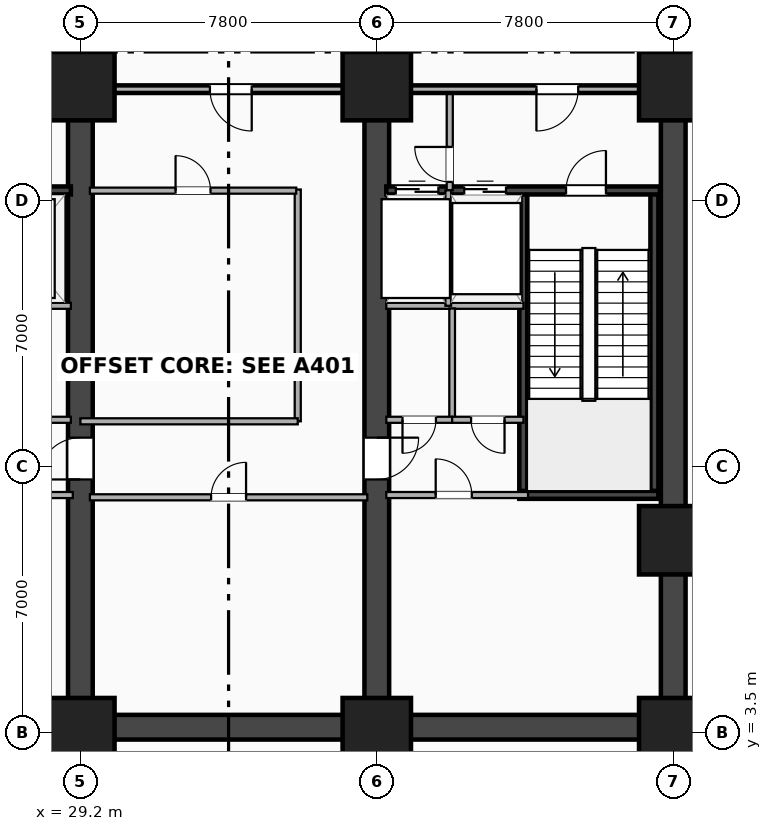
"""IFC4 building model, lengths in metres.
Left out: names, types, materials, properties, quantities, classifications, styles, units other than length and angle.
Written with IfcOpenShell. Run it as: python <this file> out.ifc"""

import sys

from ifc_helpers import new_model, si_unit, direction, frame, frame_2d, origin, origin_2d, place, context, subcontext, project, spatial, rectangle, extrude, element, fill, save


model = new_model("IFC4")
c1 = context("Model", 3, precision=1e-05, world=origin(), true_north=direction((0.0, 1.0)))
c2 = subcontext(c1, "Body", "Model", "MODEL_VIEW")
j1 = project(units=[si_unit("LENGTHUNIT", "METRE"), si_unit("PLANEANGLEUNIT", "RADIAN")], contexts=[c1])
p1 = place(None, origin())
s1 = spatial("IfcSite", under=j1, at=p1, CompositionType="ELEMENT")
p2 = place(p1, origin())
s2 = spatial("IfcBuilding", under=s1, at=p2, CompositionType="ELEMENT")
p3 = place(p2, frame((0.0, 0.0, -5.4)))
s3 = spatial("IfcBuildingStorey", under=s2, at=p3, CompositionType="ELEMENT", Elevation=-5.4)
p4 = place(p3, frame((20.3, 3.63, 0.0), z_axis=(0.0, 0.0, 1.0), x_axis=(1.0, 0.0, 0.0)))
e1 = element("IfcWall", 1, at=p4, inside=s3, PredefinedType="SHEAR", context=c2, shape_type="SweptSolid", body=[
    extrude(rectangle(XDim=24.5, YDim=0.65, at=frame_2d((12.25, 0.0))), origin(), (0.0, 0.0, 1.0), 5.05),
])
p5 = place(p3, frame((44.8, 3.5, 0.0), z_axis=(0.0, 0.0, 1.0), x_axis=(0.0, 1.0, 0.0)))
e2 = element("IfcWall", 2, at=p5, inside=s3, PredefinedType="SHEAR", context=c2, shape_type="SweptSolid", body=[
    extrude(rectangle(XDim=16.9, YDim=0.65, at=frame_2d((8.45, 0.0))), origin(), (0.0, 0.0, 1.0), 5.05),
])
p6 = place(p3, frame((29.2, 3.5, 0.0), z_axis=(0.0, 0.0, 1.0), x_axis=(0.0, 1.0, 0.0)))
e3 = element("IfcWall", 3, at=p6, inside=s3, PredefinedType="SHEAR", context=c2, shape_type="SweptSolid", body=[
    extrude(rectangle(XDim=16.9, YDim=0.65, at=frame_2d((8.45, 0.0))), origin(), (0.0, 0.0, 1.0), 5.05),
])
p7 = place(p6, frame((7.75, 0.0, 0.0), z_axis=(0.0, 0.0, 1.0), x_axis=(-1.0, 0.0, 0.0)))
e4 = element("IfcOpeningElement", 4, at=p7, cuts=e3, PredefinedType="OPENING", context=c2, shape_type="SweptSolid", body=[
    extrude(rectangle(XDim=1.1, YDim=2.15, at=frame_2d((0.55, 1.075))), frame((0.0, 0.335, 0.0), z_axis=(0.0, -1.0, 0.0), x_axis=(1.0, 0.0, 0.0)), (0.0, 0.0, 1.0), 0.67),
])
p8 = place(p3, frame((37.0, 3.5, 0.0), z_axis=(0.0, 0.0, 1.0), x_axis=(0.0, 1.0, 0.0)))
e5 = element("IfcWall", 5, at=p8, inside=s3, PredefinedType="SHEAR", context=c2, shape_type="SweptSolid", body=[
    extrude(rectangle(XDim=16.9, YDim=0.65, at=frame_2d((8.45, 0.0))), origin(), (0.0, 0.0, 1.0), 5.05),
])
p9 = place(p8, frame((6.65, 0.0, 0.0)))
e6 = element("IfcOpeningElement", 6, at=p9, cuts=e5, PredefinedType="OPENING", context=c2, shape_type="SweptSolid", body=[
    extrude(rectangle(XDim=1.1, YDim=2.15, at=frame_2d((0.55, 1.075))), frame((0.0, 0.335, 0.0), z_axis=(0.0, -1.0, 0.0), x_axis=(1.0, 0.0, 0.0)), (0.0, 0.0, 1.0), 0.67),
])
p10 = place(p3, frame((20.65, 17.755, 0.0), z_axis=(0.0, 0.0, 1.0), x_axis=(1.0, 0.0, 0.0)))
e7 = element("IfcWall", 7, at=p10, inside=s3, PredefinedType="SHEAR", context=c2, shape_type="SweptSolid", body=[
    extrude(rectangle(XDim=8.3, YDim=0.21, at=frame_2d((4.15, 0.0))), origin(), (0.0, 0.0, 1.0), 5.05),
])
p11 = place(p10, frame((2.2, 0.0, 0.0), z_axis=(0.0, 0.0, 1.0), x_axis=(-1.0, 0.0, 0.0)))
e8 = element("IfcOpeningElement", 8, at=p11, cuts=e7, PredefinedType="OPENING", context=c2, shape_type="SweptSolid", body=[
    extrude(rectangle(XDim=1.05, YDim=2.15, at=frame_2d((0.525, 1.075))), frame((0.0, 0.115, 0.0), z_axis=(0.0, -1.0, 0.0), x_axis=(1.0, 0.0, 0.0)), (0.0, 0.0, 1.0), 0.23),
])
p12 = place(p10, frame((4.15, 0.0, 0.0)))
e9 = element("IfcOpeningElement", 9, at=p12, cuts=e7, PredefinedType="OPENING", context=c2, shape_type="SweptSolid", body=[
    extrude(rectangle(XDim=1.1, YDim=2.18, at=frame_2d((0.55, 1.09))), frame((0.0, 0.115, 0.0), z_axis=(0.0, -1.0, 0.0), x_axis=(1.0, 0.0, 0.0)), (0.0, 0.0, 1.0), 0.23),
])
p13 = place(p10, frame((6.45, 0.0, 0.0)))
e10 = element("IfcOpeningElement", 10, at=p13, cuts=e7, PredefinedType="OPENING", context=c2, shape_type="SweptSolid", body=[
    extrude(rectangle(XDim=1.12, YDim=2.2, at=frame_2d((0.56, 1.1))), frame((0.0, 0.115, 0.0), z_axis=(0.0, -1.0, 0.0), x_axis=(1.0, 0.0, 0.0)), (0.0, 0.0, 1.0), 0.23),
])
for number, where, z_axis, x_axis in (
    (11, (40.855, 9.745, 0.0), (0.0, 0.0, 1.0), (0.0, 1.0, 0.0)),
    (12, (44.305, 9.745, 0.0), (0.0, 0.0, 1.0), (0.0, 1.0, 0.0)),
):
    element("IfcWall", number, at=place(p3, frame(where, z_axis=z_axis, x_axis=x_axis)), inside=s3, PredefinedType="SHEAR", context=c2, shape_type="SweptSolid", body=[
        extrude(rectangle(XDim=8.01, YDim=0.21, at=frame_2d((4.005, 0.0))), origin(), (0.0, 0.0, 1.0), 5.05),
    ])
p14 = place(p3, frame((40.75, 9.745, 0.0), z_axis=(0.0, 0.0, 1.0), x_axis=(1.0, 0.0, 0.0)))
e13 = element("IfcWall", 13, at=p14, inside=s3, PredefinedType="SHEAR", context=c2, shape_type="SweptSolid", body=[
    extrude(rectangle(XDim=3.66, YDim=0.21, at=frame_2d((1.83, 0.0))), origin(), (0.0, 0.0, 1.0), 5.05),
])
p15 = place(p3, frame((37.25, 17.755, 0.0), z_axis=(0.0, 0.0, 1.0), x_axis=(1.0, 0.0, 0.0)))
e14 = element("IfcWall", 14, at=p15, inside=s3, PredefinedType="SHEAR", context=c2, shape_type="SweptSolid", body=[
    extrude(rectangle(XDim=7.2, YDim=0.21, at=frame_2d((3.6, 0.0))), origin(), (0.0, 0.0, 1.0), 5.05),
])
p16 = place(p15, frame((0.25, 0.0, 0.0)))
e15 = element("IfcOpeningElement", 15, at=p16, cuts=e14, PredefinedType="OPENING", context=c2, shape_type="SweptSolid", body=[
    extrude(rectangle(XDim=1.12, YDim=2.2, at=frame_2d((0.56, 1.1))), frame((0.0, 0.115, 0.0), z_axis=(0.0, -1.0, 0.0), x_axis=(1.0, 0.0, 0.0)), (0.0, 0.0, 1.0), 0.23),
])
p17 = place(p15, frame((2.05, 0.0, 0.0)))
e16 = element("IfcOpeningElement", 16, at=p17, cuts=e14, PredefinedType="OPENING", context=c2, shape_type="SweptSolid", body=[
    extrude(rectangle(XDim=1.1, YDim=2.18, at=frame_2d((0.55, 1.09))), frame((0.0, 0.115, 0.0), z_axis=(0.0, -1.0, 0.0), x_axis=(1.0, 0.0, 0.0)), (0.0, 0.0, 1.0), 0.23),
])
p18 = place(p15, frame((5.78, 0.0, 0.0), z_axis=(0.0, 0.0, 1.0), x_axis=(-1.0, 0.0, 0.0)))
e17 = element("IfcOpeningElement", 17, at=p18, cuts=e14, PredefinedType="OPENING", context=c2, shape_type="SweptSolid", body=[
    extrude(rectangle(XDim=1.05, YDim=2.15, at=frame_2d((0.525, 1.075))), frame((0.0, 0.115, 0.0), z_axis=(0.0, -1.0, 0.0), x_axis=(1.0, 0.0, 0.0)), (0.0, 0.0, 1.0), 0.23),
])
for number, where, z_axis, x_axis in (
    (18, (29.2, 3.5, 0.0), (0.0, 0.0, 1.0), (1.0, 0.0, 0.0)),
    (19, (37.0, 3.5, 0.0), (0.0, 0.0, 1.0), (1.0, 0.0, 0.0)),
    (20, (44.8, 3.5, 0.0), (0.0, 0.0, 1.0), (1.0, 0.0, 0.0)),
    (21, (44.8, 8.55, 0.0), (0.0, 0.0, 1.0), (1.0, 0.0, 0.0)),
    (22, (29.2, 20.5, 0.0), (0.0, 0.0, 1.0), (1.0, 0.0, 0.0)),
    (23, (37.0, 20.5, 0.0), (0.0, 0.0, 1.0), (1.0, 0.0, 0.0)),
    (24, (44.8, 20.5, 0.0), (0.0, 0.0, 1.0), (1.0, 0.0, 0.0)),
):
    element("IfcColumn", number, at=place(p3, frame(where, z_axis=z_axis, x_axis=x_axis)), inside=s3, PredefinedType="COLUMN", context=c2, shape_type="SweptSolid", body=[
        extrude(rectangle(XDim=1.8, YDim=1.8, at=origin_2d()), origin(), (0.0, 0.0, 1.0), 5.05),
    ])
p19 = place(p3, frame((38.92, 17.76, 0.0), z_axis=(0.0, 0.0, 1.0), x_axis=(0.0, 1.0, 0.0)))
e25 = element("IfcWall", 25, at=p19, inside=s3, PredefinedType="PARTITIONING", context=c2, shape_type="SweptSolid", body=[
    extrude(rectangle(XDim=2.66, YDim=0.16, at=frame_2d((1.33, 0.0))), origin(), (0.0, 0.0, 1.0), 4.114),
])
p20 = place(p19, frame((1.14, 0.0, 0.0), z_axis=(0.0, 0.0, 1.0), x_axis=(-1.0, 0.0, 0.0)))
e26 = element("IfcOpeningElement", 26, at=p20, cuts=e25, PredefinedType="OPENING", context=c2, shape_type="SweptSolid", body=[
    extrude(rectangle(XDim=0.92, YDim=2.08, at=frame_2d((0.46, 1.04))), frame((0.0, 0.09, 0.0), z_axis=(0.0, -1.0, 0.0), x_axis=(1.0, 0.0, 0.0)), (0.0, 0.0, 1.0), 0.18),
])
p21 = place(p3, frame((24.22, 14.72, 0.0), z_axis=(0.0, 0.0, 1.0), x_axis=(1.0, 0.0, 0.0)))
e27 = element("IfcWall", 27, at=p21, inside=s3, PredefinedType="PARTITIONING", context=c2, shape_type="SweptSolid", body=[
    extrude(rectangle(XDim=4.73, YDim=0.16, at=frame_2d((2.365, 0.0))), origin(), (0.0, 0.0, 1.0), 4.18),
])
p22 = place(p3, frame((37.25, 14.72, 0.0), z_axis=(0.0, 0.0, 1.0), x_axis=(1.0, 0.0, 0.0)))
e28 = element("IfcWall", 28, at=p22, inside=s3, PredefinedType="PARTITIONING", context=c2, shape_type="SweptSolid", body=[
    extrude(rectangle(XDim=3.61, YDim=0.16, at=frame_2d((1.805, 0.0))), origin(), (0.0, 0.0, 1.0), 4.18),
])
p23 = place(p3, frame((38.88, 14.72, 0.0), z_axis=(0.0, 0.0, 1.0), x_axis=(0.0, 1.0, 0.0)))
e29 = element("IfcWall", 29, at=p23, inside=s3, PredefinedType="PARTITIONING", context=c2, shape_type="SweptSolid", body=[
    extrude(rectangle(XDim=3.04, YDim=0.15, at=frame_2d((1.52, 0.0))), origin(), (0.0, 0.0, 1.0), 5.05),
])
p24 = place(p3, frame((26.38, 20.42, 0.0), z_axis=(0.0, 0.0, 1.0), x_axis=(1.0, 0.0, 0.0)))
e30 = element("IfcWall", 30, at=p24, inside=s3, PredefinedType="PARTITIONING", context=c2, shape_type="SweptSolid", body=[
    extrude(rectangle(XDim=2.82, YDim=0.2, at=frame_2d((1.41, 0.0))), origin(), (0.0, 0.0, 1.0), 4.114),
])
p25 = place(p3, frame((29.2, 20.42, 0.0), z_axis=(0.0, 0.0, 1.0), x_axis=(1.0, 0.0, 0.0)))
e31 = element("IfcWall", 31, at=p25, inside=s3, PredefinedType="PARTITIONING", context=c2, shape_type="SweptSolid", body=[
    extrude(rectangle(XDim=7.8, YDim=0.2, at=frame_2d((3.9, 0.0))), origin(), (0.0, 0.0, 1.0), 4.114),
])
p26 = place(p25, frame((3.409, 0.0, 0.0)))
e32 = element("IfcOpeningElement", 32, at=p26, cuts=e31, PredefinedType="OPENING", context=c2, shape_type="SweptSolid", body=[
    extrude(rectangle(XDim=1.1, YDim=2.15, at=frame_2d((0.55, 1.075))), frame((0.0, 0.11, 0.0), z_axis=(0.0, -1.0, 0.0), x_axis=(1.0, 0.0, 0.0)), (0.0, 0.0, 1.0), 0.22),
])
p27 = place(p3, frame((37.0, 20.42, 0.0), z_axis=(0.0, 0.0, 1.0), x_axis=(1.0, 0.0, 0.0)))
e33 = element("IfcWall", 33, at=p27, inside=s3, PredefinedType="PARTITIONING", context=c2, shape_type="SweptSolid", body=[
    extrude(rectangle(XDim=7.45, YDim=0.2, at=frame_2d((3.725, 0.0))), origin(), (0.0, 0.0, 1.0), 4.114),
])
p28 = place(p27, frame((4.2, 0.0, 0.0)))
e34 = element("IfcOpeningElement", 34, at=p28, cuts=e33, PredefinedType="OPENING", context=c2, shape_type="SweptSolid", body=[
    extrude(rectangle(XDim=1.1, YDim=2.15, at=frame_2d((0.55, 1.075))), frame((0.0, 0.11, 0.0), z_axis=(0.0, -1.0, 0.0), x_axis=(1.0, 0.0, 0.0)), (0.0, 0.0, 1.0), 0.22),
])
p29 = place(p3, frame((24.22, 11.72, 0.0), z_axis=(0.0, 0.0, 1.0), x_axis=(1.0, 0.0, 0.0)))
e35 = element("IfcWall", 35, at=p29, inside=s3, PredefinedType="PARTITIONING", context=c2, shape_type="SweptSolid", body=[
    extrude(rectangle(XDim=4.73, YDim=0.16, at=frame_2d((2.365, 0.0))), origin(), (0.0, 0.0, 1.0), 4.18),
])
p30 = place(p29, frame((1.905, 0.0, 0.0)))
e36 = element("IfcOpeningElement", 36, at=p30, cuts=e35, PredefinedType="OPENING", context=c2, shape_type="SweptSolid", body=[
    extrude(rectangle(XDim=0.92, YDim=2.08, at=frame_2d((0.46, 1.04))), frame((0.0, 0.09, 0.0), z_axis=(0.0, -1.0, 0.0), x_axis=(1.0, 0.0, 0.0)), (0.0, 0.0, 1.0), 0.18),
])
p31 = place(p3, frame((38.983, 11.72, 0.0), z_axis=(0.0, 0.0, 1.0), x_axis=(0.0, 1.0, 0.0)))
e37 = element("IfcWall", 37, at=p31, inside=s3, PredefinedType="PARTITIONING", context=c2, shape_type="SweptSolid", body=[
    extrude(rectangle(XDim=2.93, YDim=0.15, at=frame_2d((1.465, 0.0))), origin(), (0.0, 0.0, 1.0), 5.05),
])
p32 = place(p3, frame((37.25, 11.72, 0.0), z_axis=(0.0, 0.0, 1.0), x_axis=(1.0, 0.0, 0.0)))
e38 = element("IfcWall", 38, at=p32, inside=s3, PredefinedType="PARTITIONING", context=c2, shape_type="SweptSolid", body=[
    extrude(rectangle(XDim=1.733, YDim=0.16, at=frame_2d((0.866, 0.0))), origin(), (0.0, 0.0, 1.0), 4.18),
])
p33 = place(p32, frame((0.427, 0.0, 0.0)))
e39 = element("IfcOpeningElement", 39, at=p33, cuts=e38, PredefinedType="OPENING", context=c2, shape_type="SweptSolid", body=[
    extrude(rectangle(XDim=0.88, YDim=2.08, at=frame_2d((0.44, 1.04))), frame((0.0, 0.09, 0.0), z_axis=(0.0, -1.0, 0.0), x_axis=(1.0, 0.0, 0.0)), (0.0, 0.0, 1.0), 0.18),
])
p34 = place(p3, frame((38.983, 11.72, 0.0), z_axis=(0.0, 0.0, 1.0), x_axis=(1.0, 0.0, 0.0)))
e40 = element("IfcWall", 40, at=p34, inside=s3, PredefinedType="PARTITIONING", context=c2, shape_type="SweptSolid", body=[
    extrude(rectangle(XDim=1.877, YDim=0.16, at=frame_2d((0.938, 0.0))), origin(), (0.0, 0.0, 1.0), 5.05),
])
p35 = place(p34, frame((0.499, 0.0, 0.0)))
e41 = element("IfcOpeningElement", 41, at=p35, cuts=e40, PredefinedType="OPENING", context=c2, shape_type="SweptSolid", body=[
    extrude(rectangle(XDim=0.88, YDim=2.08, at=frame_2d((0.44, 1.04))), frame((0.0, 0.09, 0.0), z_axis=(0.0, -1.0, 0.0), x_axis=(1.0, 0.0, 0.0)), (0.0, 0.0, 1.0), 0.18),
])
p36 = place(p3, frame((24.2, 9.74, 0.0), z_axis=(0.0, 0.0, 1.0), x_axis=(1.0, 0.0, 0.0)))
e42 = element("IfcWall", 42, at=p36, inside=s3, PredefinedType="PARTITIONING", context=c2, shape_type="SweptSolid", body=[
    extrude(rectangle(XDim=4.8, YDim=0.16, at=frame_2d((2.4, 0.0))), origin(), (0.0, 0.0, 1.0), 4.18),
])
p37 = place(p36, frame((2.75, 0.0, 0.0), z_axis=(0.0, 0.0, 1.0), x_axis=(-1.0, 0.0, 0.0)))
e43 = element("IfcOpeningElement", 43, at=p37, cuts=e42, PredefinedType="OPENING", context=c2, shape_type="SweptSolid", body=[
    extrude(rectangle(XDim=0.95, YDim=2.15, at=frame_2d((0.475, 1.075))), frame((0.0, 0.09, 0.0), z_axis=(0.0, -1.0, 0.0), x_axis=(1.0, 0.0, 0.0)), (0.0, 0.0, 1.0), 0.18),
])
p38 = place(p3, frame((37.25, 9.74, 0.0), z_axis=(0.0, 0.0, 1.0), x_axis=(1.0, 0.0, 0.0)))
e44 = element("IfcWall", 44, at=p38, inside=s3, PredefinedType="PARTITIONING", context=c2, shape_type="SweptSolid", body=[
    extrude(rectangle(XDim=3.73, YDim=0.16, at=frame_2d((1.865, 0.0))), origin(), (0.0, 0.0, 1.0), 4.18),
])
p39 = place(p38, frame((2.25, 0.0, 0.0), z_axis=(0.0, 0.0, 1.0), x_axis=(-1.0, 0.0, 0.0)))
e45 = element("IfcOpeningElement", 45, at=p39, cuts=e44, PredefinedType="OPENING", context=c2, shape_type="SweptSolid", body=[
    extrude(rectangle(XDim=0.95, YDim=2.15, at=frame_2d((0.475, 1.075))), frame((0.0, 0.09, 0.0), z_axis=(0.0, -1.0, 0.0), x_axis=(1.0, 0.0, 0.0)), (0.0, 0.0, 1.0), 0.18),
])
p40 = place(p3, frame((34.92, 11.68, 0.0), z_axis=(0.0, 0.0, 1.0), x_axis=(0.0, 1.0, 0.0)))
e46 = element("IfcWall", 46, at=p40, inside=s3, PredefinedType="PARTITIONING", context=c2, shape_type="SweptSolid", body=[
    extrude(rectangle(XDim=6.1, YDim=0.16, at=frame_2d((3.05, 0.0))), origin(), (0.0, 0.0, 1.0), 5.05),
])
p41 = place(p3, frame((29.45, 9.68, 0.0), z_axis=(0.0, 0.0, 1.0), x_axis=(1.0, 0.0, 0.0)))
e47 = element("IfcWall", 47, at=p41, inside=s3, PredefinedType="PARTITIONING", context=c2, shape_type="SweptSolid", body=[
    extrude(rectangle(XDim=7.3, YDim=0.16, at=frame_2d((3.65, 0.0))), origin(), (0.0, 0.0, 1.0), 4.18),
])
p42 = place(p41, frame((4.11, 0.0, 0.0), z_axis=(0.0, 0.0, 1.0), x_axis=(-1.0, 0.0, 0.0)))
e48 = element("IfcOpeningElement", 48, at=p42, cuts=e47, PredefinedType="OPENING", context=c2, shape_type="SweptSolid", body=[
    extrude(rectangle(XDim=0.92, YDim=2.08, at=frame_2d((0.46, 1.04))), frame((0.0, 0.09, 0.0), z_axis=(0.0, -1.0, 0.0), x_axis=(1.0, 0.0, 0.0)), (0.0, 0.0, 1.0), 0.18),
])
p43 = place(p3, frame((29.2, 11.68, 0.0), z_axis=(0.0, 0.0, 1.0), x_axis=(1.0, 0.0, 0.0)))
e49 = element("IfcWall", 49, at=p43, inside=s3, PredefinedType="PARTITIONING", context=c2, shape_type="SweptSolid", body=[
    extrude(rectangle(XDim=5.72, YDim=0.16, at=frame_2d((2.86, 0.0))), origin(), (0.0, 0.0, 1.0), 4.18),
])
p44 = place(p3, frame((29.45, 17.75, 0.0), z_axis=(0.0, 0.0, 1.0), x_axis=(1.0, 0.0, 0.0)))
e50 = element("IfcWall", 50, at=p44, inside=s3, PredefinedType="PARTITIONING", context=c2, shape_type="SweptSolid", body=[
    extrude(rectangle(XDim=5.43, YDim=0.16, at=frame_2d((2.715, 0.0))), origin(), (0.0, 0.0, 1.0), 4.18),
])
p45 = place(p44, frame((3.175, 0.0, 0.0), z_axis=(0.0, 0.0, 1.0), x_axis=(-1.0, 0.0, 0.0)))
e51 = element("IfcOpeningElement", 51, at=p45, cuts=e50, PredefinedType="OPENING", context=c2, shape_type="SweptSolid", body=[
    extrude(rectangle(XDim=0.92, YDim=2.08, at=frame_2d((0.46, 1.04))), frame((0.0, 0.09, 0.0), z_axis=(0.0, -1.0, 0.0), x_axis=(1.0, 0.0, 0.0)), (0.0, 0.0, 1.0), 0.18),
])
p46 = place(p3, frame((44.8, 20.42, 0.0), z_axis=(0.0, 0.0, 1.0), x_axis=(1.0, 0.0, 0.0)))
e52 = element("IfcWall", 52, at=p46, inside=s3, PredefinedType="PARTITIONING", context=c2, shape_type="SweptSolid", body=[
    extrude(rectangle(XDim=5.15, YDim=0.2, at=frame_2d((2.575, 0.0))), origin(), (0.0, 0.0, 1.0), 4.114),
])
p47 = place(p46, frame((4.813, 0.0, 0.0), z_axis=(0.0, 0.0, 1.0), x_axis=(-1.0, 0.0, 0.0)))
e53 = element("IfcOpeningElement", 53, at=p47, cuts=e52, PredefinedType="OPENING", context=c2, shape_type="SweptSolid", body=[
    extrude(rectangle(XDim=1.1, YDim=2.15, at=frame_2d((0.55, 1.075))), frame((0.0, 0.11, 0.0), z_axis=(0.0, -1.0, 0.0), x_axis=(1.0, 0.0, 0.0)), (0.0, 0.0, 1.0), 0.22),
])
p48 = place(p16, origin())
e54 = element("IfcDoor", 54, at=p48, inside=s3, OperationType="DOUBLE_DOOR_SLIDING", PredefinedType="DOOR", context=c2, shape_type="SweptSolid", body=[
    extrude(rectangle(XDim=1.12, YDim=2.2, at=frame_2d((0.56, 1.1))), frame((0.0, 0.025, 0.0), z_axis=(0.0, -1.0, 0.0), x_axis=(1.0, 0.0, 0.0)), (0.0, 0.0, 1.0), 0.05),
])
fill(e15, e54)
p49 = place(p17, origin())
e55 = element("IfcDoor", 55, at=p49, inside=s3, OperationType="DOUBLE_DOOR_SLIDING", PredefinedType="DOOR", context=c2, shape_type="SweptSolid", body=[
    extrude(rectangle(XDim=1.1, YDim=2.18, at=frame_2d((0.55, 1.09))), frame((0.0, 0.025, 0.0), z_axis=(0.0, -1.0, 0.0), x_axis=(1.0, 0.0, 0.0)), (0.0, 0.0, 1.0), 0.05),
])
fill(e16, e55)
p50 = place(p18, origin())
e56 = element("IfcDoor", 56, at=p50, inside=s3, OperationType="SINGLE_SWING_RIGHT", PredefinedType="DOOR", context=c2, shape_type="SweptSolid", body=[
    extrude(rectangle(XDim=1.05, YDim=2.15, at=frame_2d((0.525, 1.075))), frame((0.0, 0.025, 0.0), z_axis=(0.0, -1.0, 0.0), x_axis=(1.0, 0.0, 0.0)), (0.0, 0.0, 1.0), 0.05),
])
fill(e17, e56)
p51 = place(p7, origin())
e57 = element("IfcDoor", 57, at=p51, inside=s3, OperationType="SINGLE_SWING_LEFT", PredefinedType="DOOR", context=c2, shape_type="SweptSolid", body=[
    extrude(rectangle(XDim=1.1, YDim=2.15, at=frame_2d((0.55, 1.075))), frame((0.0, 0.025, 0.0), z_axis=(0.0, -1.0, 0.0), x_axis=(1.0, 0.0, 0.0)), (0.0, 0.0, 1.0), 0.05),
])
fill(e4, e57)
p52 = place(p9, origin())
e58 = element("IfcDoor", 58, at=p52, inside=s3, OperationType="SINGLE_SWING_RIGHT", PredefinedType="DOOR", context=c2, shape_type="SweptSolid", body=[
    extrude(rectangle(XDim=1.1, YDim=2.15, at=frame_2d((0.55, 1.075))), frame((0.0, 0.025, 0.0), z_axis=(0.0, -1.0, 0.0), x_axis=(1.0, 0.0, 0.0)), (0.0, 0.0, 1.0), 0.05),
])
fill(e6, e58)
p53 = place(p20, origin())
e59 = element("IfcDoor", 59, at=p53, inside=s3, OperationType="SINGLE_SWING_RIGHT", PredefinedType="DOOR", context=c2, shape_type="SweptSolid", body=[
    extrude(rectangle(XDim=0.92, YDim=2.08, at=frame_2d((0.46, 1.04))), frame((0.0, 0.025, 0.0), z_axis=(0.0, -1.0, 0.0), x_axis=(1.0, 0.0, 0.0)), (0.0, 0.0, 1.0), 0.05),
])
fill(e26, e59)
p54 = place(p26, origin())
e60 = element("IfcDoor", 60, at=p54, inside=s3, OperationType="SINGLE_SWING_RIGHT", PredefinedType="DOOR", context=c2, shape_type="SweptSolid", body=[
    extrude(rectangle(XDim=1.1, YDim=2.15, at=frame_2d((0.55, 1.075))), frame((0.0, 0.025, 0.0), z_axis=(0.0, -1.0, 0.0), x_axis=(1.0, 0.0, 0.0)), (0.0, 0.0, 1.0), 0.05),
])
fill(e32, e60)
p55 = place(p28, origin())
e61 = element("IfcDoor", 61, at=p55, inside=s3, OperationType="SINGLE_SWING_LEFT", PredefinedType="DOOR", context=c2, shape_type="SweptSolid", body=[
    extrude(rectangle(XDim=1.1, YDim=2.15, at=frame_2d((0.55, 1.075))), frame((0.0, 0.025, 0.0), z_axis=(0.0, -1.0, 0.0), x_axis=(1.0, 0.0, 0.0)), (0.0, 0.0, 1.0), 0.05),
])
fill(e34, e61)
p56 = place(p33, origin())
e62 = element("IfcDoor", 62, at=p56, inside=s3, OperationType="SINGLE_SWING_LEFT", PredefinedType="DOOR", context=c2, shape_type="SweptSolid", body=[
    extrude(rectangle(XDim=0.88, YDim=2.08, at=frame_2d((0.44, 1.04))), frame((0.0, 0.025, 0.0), z_axis=(0.0, -1.0, 0.0), x_axis=(1.0, 0.0, 0.0)), (0.0, 0.0, 1.0), 0.05),
])
fill(e39, e62)
p57 = place(p35, origin())
e63 = element("IfcDoor", 63, at=p57, inside=s3, OperationType="SINGLE_SWING_RIGHT", PredefinedType="DOOR", context=c2, shape_type="SweptSolid", body=[
    extrude(rectangle(XDim=0.88, YDim=2.08, at=frame_2d((0.44, 1.04))), frame((0.0, 0.025, 0.0), z_axis=(0.0, -1.0, 0.0), x_axis=(1.0, 0.0, 0.0)), (0.0, 0.0, 1.0), 0.05),
])
fill(e41, e63)
p58 = place(p39, origin())
e64 = element("IfcDoor", 64, at=p58, inside=s3, OperationType="SINGLE_SWING_LEFT", PredefinedType="DOOR", context=c2, shape_type="SweptSolid", body=[
    extrude(rectangle(XDim=0.95, YDim=2.15, at=frame_2d((0.475, 1.075))), frame((0.0, 0.025, 0.0), z_axis=(0.0, -1.0, 0.0), x_axis=(1.0, 0.0, 0.0)), (0.0, 0.0, 1.0), 0.05),
])
fill(e45, e64)
p59 = place(p42, origin())
e65 = element("IfcDoor", 65, at=p59, inside=s3, OperationType="SINGLE_SWING_RIGHT", PredefinedType="DOOR", context=c2, shape_type="SweptSolid", body=[
    extrude(rectangle(XDim=0.92, YDim=2.08, at=frame_2d((0.46, 1.04))), frame((0.0, 0.025, 0.0), z_axis=(0.0, -1.0, 0.0), x_axis=(1.0, 0.0, 0.0)), (0.0, 0.0, 1.0), 0.05),
])
fill(e48, e65)
p60 = place(p45, origin())
e66 = element("IfcDoor", 66, at=p60, inside=s3, OperationType="SINGLE_SWING_LEFT", PredefinedType="DOOR", context=c2, shape_type="SweptSolid", body=[
    extrude(rectangle(XDim=0.92, YDim=2.08, at=frame_2d((0.46, 1.04))), frame((0.0, 0.025, 0.0), z_axis=(0.0, -1.0, 0.0), x_axis=(1.0, 0.0, 0.0)), (0.0, 0.0, 1.0), 0.05),
])
fill(e51, e66)
save(model, sys.argv[1])
